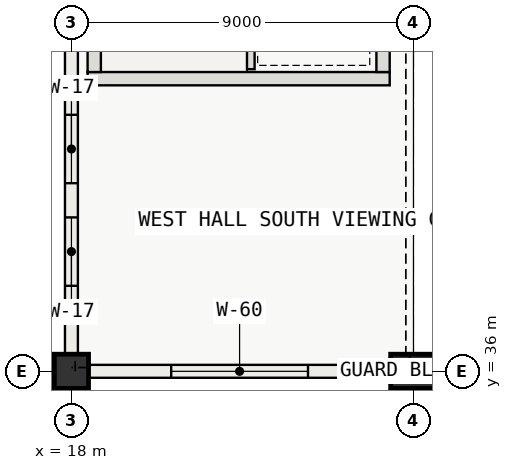
"""IFC4 building model, lengths in metres.
Left out: names, types, materials, properties, quantities, classifications, styles, units other than length and angle.
Written with IfcOpenShell. Run it as: python <this file> out.ifc"""

import sys

from ifc_helpers import new_model, si_unit, direction, frame, frame_2d, origin, origin_2d, place, context, subcontext, project, spatial, rectangle, extrude, element, fill, save


model = new_model("IFC4")
c1 = context("Model", 3, precision=1e-05, world=origin(), true_north=direction((0.0, 1.0)))
c2 = subcontext(c1, "Body", "Model", "MODEL_VIEW")
j1 = project(units=[si_unit("LENGTHUNIT", "METRE"), si_unit("PLANEANGLEUNIT", "RADIAN")], contexts=[c1])
p1 = place(None, origin())
s1 = spatial("IfcSite", under=j1, at=p1, CompositionType="ELEMENT")
p2 = place(p1, origin())
s2 = spatial("IfcBuilding", under=s1, at=p2, CompositionType="ELEMENT")
p3 = place(p2, frame((0.0, 0.0, 6.0)))
s3 = spatial("IfcBuildingStorey", under=s2, at=p3, CompositionType="ELEMENT", Elevation=6.0)
p4 = place(p3, frame((18.425, 43.7, 0.0), z_axis=(0.0, 0.0, 1.0), x_axis=(1.0, 0.0, 0.0)))
e1 = element("IfcWall", 1, at=p4, inside=s3, PredefinedType="SHEAR", context=c2, shape_type="SweptSolid", body=[
    extrude(rectangle(XDim=7.95, YDim=0.35, at=frame_2d((3.975, 0.0))), origin(), (0.0, 0.0, 1.0), 6.0),
])
for number, where, z_axis, x_axis in (
    (2, (18.6, 43.875, 0.0), (0.0, 0.0, 1.0), (0.0, 1.0, 0.0)),
    (3, (26.2, 43.875, 0.0), (0.0, 0.0, 1.0), (0.0, 1.0, 0.0)),
):
    element("IfcWall", number, at=place(p3, frame(where, z_axis=z_axis, x_axis=x_axis)), inside=s3, PredefinedType="SHEAR", context=c2, shape_type="SweptSolid", body=[
        extrude(rectangle(XDim=11.25, YDim=0.35, at=frame_2d((5.625, 0.0))), origin(), (0.0, 0.0, 1.0), 6.0),
    ])
p5 = place(p3, frame((18.0, 36.0, 0.0), z_axis=(0.0, 0.0, 1.0), x_axis=(1.0, 0.0, 0.0)))
e4 = element("IfcColumn", 4, at=p5, inside=s3, PredefinedType="COLUMN", context=c2, shape_type="SweptSolid", body=[
    extrude(rectangle(XDim=0.9, YDim=0.9, at=origin_2d()), origin(), (0.0, 0.0, 1.0), 6.0),
])
p6 = place(p3, frame((27.0, 36.0, 0.0), z_axis=(0.0, 0.0, 1.0), x_axis=(1.0, 0.0, 0.0)))
e5 = element("IfcColumn", 5, at=p6, inside=s3, PredefinedType="COLUMN", context=c2, shape_type="SweptSolid", body=[
    extrude(rectangle(XDim=1.2, YDim=0.9, at=origin_2d()), origin(), (0.0, 0.0, 1.0), 6.0),
])
p7 = place(p3, frame((18.0, 44.551, 0.0), z_axis=(0.0, 0.0, 1.0), x_axis=(0.0, -1.0, 0.0)))
e6 = element("IfcWall", 6, at=p7, inside=s3, PredefinedType="SOLIDWALL", context=c2, shape_type="SweptSolid", body=[
    extrude(rectangle(XDim=8.101, YDim=0.34, at=frame_2d((4.051, 0.0))), origin(), (0.0, 0.0, 1.0), 4.66),
])
p8 = place(p7, frame((1.801, 0.0, 1.0)))
e7 = element("IfcOpeningElement", 7, at=p8, cuts=e6, PredefinedType="OPENING", context=c2, shape_type="SweptSolid", body=[
    extrude(rectangle(XDim=1.8, YDim=1.5, at=frame_2d((0.9, 0.75))), frame((0.0, 0.18, 0.0), z_axis=(0.0, -1.0, 0.0), x_axis=(1.0, 0.0, 0.0)), (0.0, 0.0, 1.0), 0.36),
])
p9 = place(p7, frame((4.5, 0.0, 1.0)))
e8 = element("IfcOpeningElement", 8, at=p9, cuts=e6, PredefinedType="OPENING", context=c2, shape_type="SweptSolid", body=[
    extrude(rectangle(XDim=1.8, YDim=1.5, at=frame_2d((0.9, 0.75))), frame((0.0, 0.18, 0.0), z_axis=(0.0, -1.0, 0.0), x_axis=(1.0, 0.0, 0.0)), (0.0, 0.0, 1.0), 0.36),
])
p10 = place(p3, frame((18.449, 36.0, 0.0), z_axis=(0.0, 0.0, 1.0), x_axis=(1.0, 0.0, 0.0)))
e9 = element("IfcWall", 9, at=p10, inside=s3, PredefinedType="SOLIDWALL", context=c2, shape_type="SweptSolid", body=[
    extrude(rectangle(XDim=7.951, YDim=0.34, at=frame_2d((3.976, 0.0))), origin(), (0.0, 0.0, 1.0), 4.66),
])
p11 = place(p10, frame((2.176, 0.0, 1.0)))
e10 = element("IfcOpeningElement", 10, at=p11, cuts=e9, PredefinedType="OPENING", context=c2, shape_type="SweptSolid", body=[
    extrude(rectangle(XDim=3.6, YDim=1.7, at=frame_2d((1.8, 0.85))), frame((0.0, 0.18, 0.0), z_axis=(0.0, -1.0, 0.0), x_axis=(1.0, 0.0, 0.0)), (0.0, 0.0, 1.0), 0.36),
])
p12 = place(p3, frame((22.72, 43.95, 0.0), z_axis=(0.0, 0.0, 1.0), x_axis=(0.0, 1.0, 0.0)))
e11 = element("IfcWall", 11, at=p12, inside=s3, PredefinedType="SOLIDWALL", context=c2, shape_type="SweptSolid", body=[
    extrude(rectangle(XDim=8.0, YDim=0.2, at=frame_2d((4.0, 0.0))), origin(), (0.0, 0.0, 1.0), 6.0),
])
p13 = place(p8, origin())
e12 = element("IfcWindow", 12, at=p13, inside=s3, PartitioningType="SINGLE_PANEL", PredefinedType="WINDOW", context=c2, shape_type="SweptSolid", body=[
    extrude(rectangle(XDim=1.8, YDim=1.5, at=frame_2d((0.9, 0.75))), frame((0.0, 0.03, 0.0), z_axis=(0.0, -1.0, 0.0), x_axis=(1.0, 0.0, 0.0)), (0.0, 0.0, 1.0), 0.06),
])
fill(e7, e12)
p14 = place(p9, origin())
e13 = element("IfcWindow", 13, at=p14, inside=s3, PartitioningType="SINGLE_PANEL", PredefinedType="WINDOW", context=c2, shape_type="SweptSolid", body=[
    extrude(rectangle(XDim=1.8, YDim=1.5, at=frame_2d((0.9, 0.75))), frame((0.0, 0.03, 0.0), z_axis=(0.0, -1.0, 0.0), x_axis=(1.0, 0.0, 0.0)), (0.0, 0.0, 1.0), 0.06),
])
fill(e8, e13)
p15 = place(p11, origin())
e14 = element("IfcWindow", 14, at=p15, inside=s3, PartitioningType="SINGLE_PANEL", PredefinedType="WINDOW", context=c2, shape_type="SweptSolid", body=[
    extrude(rectangle(XDim=3.6, YDim=1.7, at=frame_2d((1.8, 0.85))), frame((0.0, 0.03, 0.0), z_axis=(0.0, -1.0, 0.0), x_axis=(1.0, 0.0, 0.0)), (0.0, 0.0, 1.0), 0.06),
])
fill(e10, e14)
save(model, sys.argv[1])
